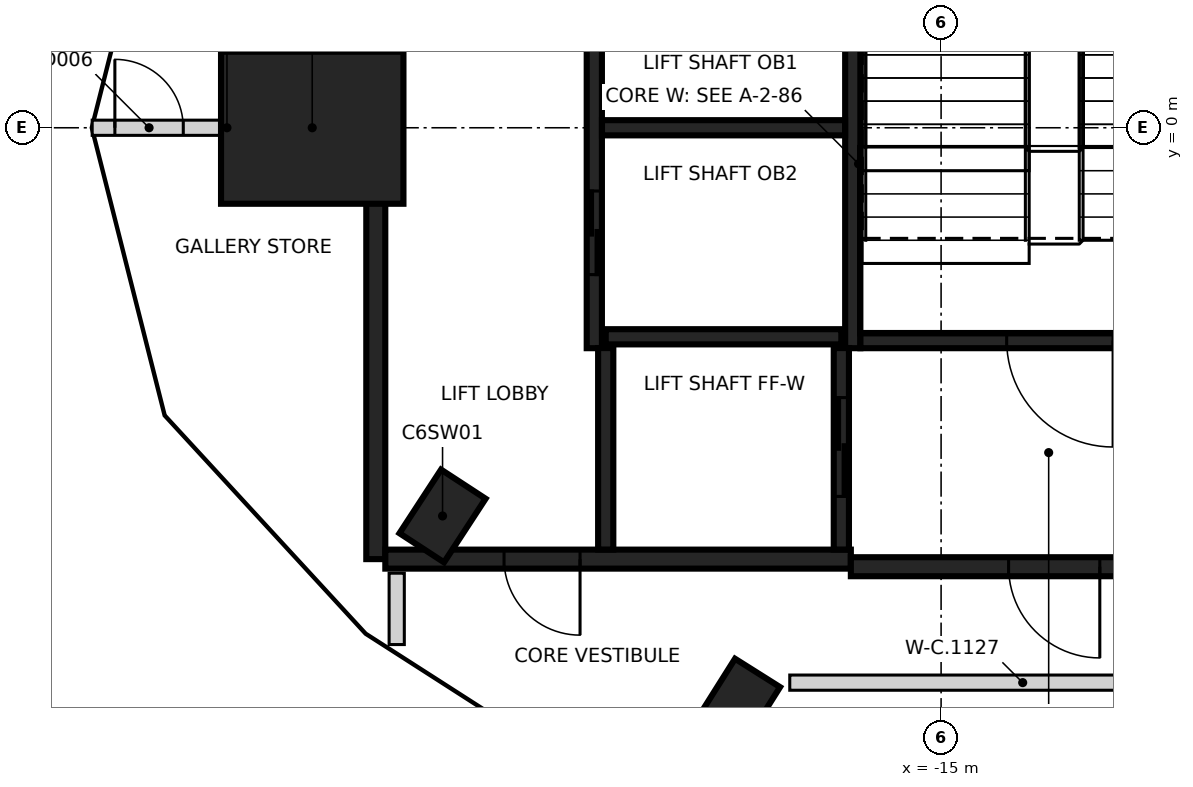
"""IFC4 building model, lengths in metres.
Left out: names, types, materials, properties, quantities, classifications, styles, units other than length and angle.
Written with IfcOpenShell. Run it as: python <this file> out.ifc"""

import sys

from ifc_helpers import new_model, si_unit, direction, frame, frame_2d, origin, origin_2d, place, context, subcontext, project, spatial, rectangle, extrude, element, fill, save


model = new_model("IFC4")
c1 = context("Model", 3, precision=1e-05, world=origin(), true_north=direction((0.0, 1.0)))
c2 = subcontext(c1, "Body", "Model", "MODEL_VIEW")
j1 = project(units=[si_unit("LENGTHUNIT", "METRE"), si_unit("PLANEANGLEUNIT", "RADIAN")], contexts=[c1])
p1 = place(None, origin())
s1 = spatial("IfcSite", under=j1, at=p1, CompositionType="ELEMENT")
p2 = place(p1, origin())
s2 = spatial("IfcBuilding", under=s1, at=p2, CompositionType="ELEMENT")
p3 = place(p2, frame((0.0, 0.0, 312.6)))
s3 = spatial("IfcBuildingStorey", under=s2, at=p3, CompositionType="ELEMENT", Elevation=312.6)
for number, where, z_axis, x_axis in (
    (1, (-21.559, -5.107, -0.35), (0.0, 0.0, 1.0), (0.547, 0.837, 0.0)),
    (2, (-17.681, -7.595, -0.35), (0.0, 0.0, 1.0), (0.533, 0.846, 0.0)),
):
    element("IfcColumn", number, at=place(p3, frame(where, z_axis=z_axis, x_axis=x_axis)), inside=s3, PredefinedType="COLUMN", context=c2, shape_type="SweptSolid", body=[
        extrude(rectangle(XDim=1.0, YDim=0.7, at=origin_2d()), origin(), (0.0, 0.0, 1.0), 8.1),
    ])
p4 = place(p3, frame((-23.273, 0.0, -0.35), z_axis=(0.0, 0.0, 1.0), x_axis=(1.0, 0.0, 0.0)))
e3 = element("IfcColumn", 3, at=p4, inside=s3, PredefinedType="COLUMN", context=c2, shape_type="SweptSolid", body=[
    extrude(rectangle(XDim=2.4, YDim=2.0, at=origin_2d()), origin(), (0.0, 0.0, 1.0), 8.1),
])
p5 = place(p3, frame((-22.437, -5.675, 0.0), z_axis=(0.0, 0.0, 1.0), x_axis=(0.0, 1.0, 0.0)))
e4 = element("IfcWall", 4, at=p5, inside=s3, PredefinedType="SHEAR", context=c2, shape_type="SweptSolid", body=[
    extrude(rectangle(XDim=8.75, YDim=0.25, at=frame_2d((4.375, 0.0))), origin(), (0.0, 0.0, 1.0), 7.75),
])
p6 = place(p3, frame((-16.187, -5.675, 0.0), z_axis=(0.0, 0.0, 1.0), x_axis=(-1.0, 0.0, 0.0)))
e5 = element("IfcWall", 5, at=p6, inside=s3, PredefinedType="SHEAR", context=c2, shape_type="SweptSolid", body=[
    extrude(rectangle(XDim=6.125, YDim=0.25, at=frame_2d((3.062, 0.0))), origin(), (0.0, 0.0, 1.0), 7.75),
])
p7 = place(p6, frame((3.563, 0.0, 0.0)))
e6 = element("IfcOpeningElement", 6, at=p7, cuts=e5, PredefinedType="OPENING", context=c2, shape_type="SweptSolid", body=[
    extrude(rectangle(XDim=1.0, YDim=2.1, at=frame_2d((0.5, 1.05))), frame((0.0, 0.135, 0.0), z_axis=(0.0, -1.0, 0.0), x_axis=(1.0, 0.0, 0.0)), (0.0, 0.0, 1.0), 0.27),
])
p8 = place(p3, frame((-10.963, -5.775, 0.0), z_axis=(0.0, 0.0, 1.0), x_axis=(-1.0, 0.0, 0.0)))
e7 = element("IfcWall", 7, at=p8, inside=s3, PredefinedType="SHEAR", context=c2, shape_type="SweptSolid", body=[
    extrude(rectangle(XDim=5.225, YDim=0.25, at=frame_2d((2.612, 0.0))), origin(), (0.0, 0.0, 1.0), 7.75),
])
p9 = place(p8, frame((1.949, 0.0, 0.0)))
e8 = element("IfcOpeningElement", 8, at=p9, cuts=e7, PredefinedType="OPENING", context=c2, shape_type="SweptSolid", body=[
    extrude(rectangle(XDim=1.2, YDim=2.1, at=frame_2d((0.6, 1.05))), frame((0.0, 0.135, 0.0), z_axis=(0.0, -1.0, 0.0), x_axis=(1.0, 0.0, 0.0)), (0.0, 0.0, 1.0), 0.27),
])
p10 = place(p3, frame((-16.162, 3.074, 0.0), z_axis=(0.0, 0.0, 1.0), x_axis=(0.0, -1.0, 0.0)))
e9 = element("IfcWall", 9, at=p10, inside=s3, PredefinedType="SHEAR", context=c2, shape_type="SweptSolid", body=[
    extrude(rectangle(XDim=5.974, YDim=0.2, at=frame_2d((2.987, 0.0))), origin(), (0.0, 0.0, 1.0), 7.75),
])
p11 = place(p3, frame((-19.562, -2.9, 0.0), z_axis=(0.0, 0.0, 1.0), x_axis=(0.0, 1.0, 0.0)))
e10 = element("IfcWall", 10, at=p11, inside=s3, PredefinedType="SHEAR", context=c2, shape_type="SweptSolid", body=[
    extrude(rectangle(XDim=6.1, YDim=0.2, at=frame_2d((3.05, 0.0))), origin(), (0.0, 0.0, 1.0), 7.75),
])
p12 = place(p11, frame((3.95, 0.0, 0.0)))
e11 = element("IfcOpeningElement", 11, at=p12, cuts=e10, PredefinedType="OPENING", context=c2, shape_type="SweptSolid", body=[
    extrude(rectangle(XDim=1.1, YDim=2.1, at=frame_2d((0.55, 1.05))), frame((0.0, 0.11, 0.0), z_axis=(0.0, -1.0, 0.0), x_axis=(1.0, 0.0, 0.0)), (0.0, 0.0, 1.0), 0.22),
])
p13 = place(p11, frame((0.968, 0.0, 0.0)))
e12 = element("IfcOpeningElement", 12, at=p13, cuts=e10, PredefinedType="OPENING", context=c2, shape_type="SweptSolid", body=[
    extrude(rectangle(XDim=1.1, YDim=2.1, at=frame_2d((0.55, 1.05))), frame((0.0, 0.11, 0.0), z_axis=(0.0, -1.0, 0.0), x_axis=(1.0, 0.0, 0.0)), (0.0, 0.0, 1.0), 0.22),
])
p14 = place(p3, frame((-10.963, -2.8, 0.0), z_axis=(0.0, 0.0, 1.0), x_axis=(-1.0, 0.0, 0.0)))
e13 = element("IfcWall", 13, at=p14, inside=s3, PredefinedType="SHEAR", context=c2, shape_type="SweptSolid", body=[
    extrude(rectangle(XDim=5.098, YDim=0.2, at=frame_2d((2.549, 0.0))), origin(), (0.0, 0.0, 1.0), 7.75),
])
p15 = place(p14, frame((1.774, 0.0, 0.0)))
e14 = element("IfcOpeningElement", 14, at=p15, cuts=e13, PredefinedType="OPENING", context=c2, shape_type="SweptSolid", body=[
    extrude(rectangle(XDim=1.4, YDim=2.1, at=frame_2d((0.7, 1.05))), frame((0.0, 0.11, 0.0), z_axis=(0.0, -1.0, 0.0), x_axis=(1.0, 0.0, 0.0)), (0.0, 0.0, 1.0), 0.22),
])
p16 = place(p3, frame((-16.263, 0.0, 0.0), z_axis=(0.0, 0.0, 1.0), x_axis=(-1.0, 0.0, 0.0)))
e15 = element("IfcWall", 15, at=p16, inside=s3, PredefinedType="SHEAR", context=c2, shape_type="SweptSolid", body=[
    extrude(rectangle(XDim=3.198, YDim=0.2, at=frame_2d((1.599, 0.0))), origin(), (0.0, 0.0, 1.0), 7.75),
])
p17 = place(p3, frame((-19.412, -2.75, 0.0), z_axis=(0.0, 0.0, 1.0), x_axis=(1.0, 0.0, 0.0)))
e16 = element("IfcWall", 16, at=p17, inside=s3, PredefinedType="SHEAR", context=c2, shape_type="SweptSolid", body=[
    extrude(rectangle(XDim=3.1, YDim=0.2, at=frame_2d((1.55, 0.0))), origin(), (0.0, 0.0, 1.0), 7.75),
])
p18 = place(p3, frame((-16.312, -2.898, 0.0), z_axis=(0.0, 0.0, 1.0), x_axis=(0.0, -1.0, 0.0)))
e17 = element("IfcWall", 17, at=p18, inside=s3, PredefinedType="SHEAR", context=c2, shape_type="SweptSolid", body=[
    extrude(rectangle(XDim=2.651, YDim=0.2, at=frame_2d((1.325, 0.0))), origin(), (0.0, 0.0, 1.0), 7.75),
])
p19 = place(p18, frame((0.652, 0.0, 0.0)))
e18 = element("IfcOpeningElement", 18, at=p19, cuts=e17, PredefinedType="OPENING", context=c2, shape_type="SweptSolid", body=[
    extrude(rectangle(XDim=1.3, YDim=2.1, at=frame_2d((0.65, 1.05))), frame((0.0, 0.11, 0.0), z_axis=(0.0, -1.0, 0.0), x_axis=(1.0, 0.0, 0.0)), (0.0, 0.0, 1.0), 0.22),
])
p20 = place(p3, frame((-19.412, -5.549, 0.0), z_axis=(0.0, 0.0, 1.0), x_axis=(0.0, 1.0, 0.0)))
e19 = element("IfcWall", 19, at=p20, inside=s3, PredefinedType="SHEAR", context=c2, shape_type="SweptSolid", body=[
    extrude(rectangle(XDim=2.651, YDim=0.2, at=frame_2d((1.325, 0.0))), origin(), (0.0, 0.0, 1.0), 7.75),
])
p21 = place(p3, frame((-22.162, -6.799, 0.0), z_axis=(0.0, 0.0, 1.0), x_axis=(0.0, 1.0, 0.0)))
e20 = element("IfcWall", 20, at=p21, inside=s3, PredefinedType="PARTITIONING", context=c2, shape_type="SweptSolid", body=[
    extrude(rectangle(XDim=0.939, YDim=0.2, at=frame_2d((0.469, 0.0))), origin(), (0.0, 0.0, 1.0), 7.75),
])
p22 = place(p3, frame((-16.991, -7.3, 0.0), z_axis=(0.0, 0.0, 1.0), x_axis=(1.0, 0.0, 0.0)))
e21 = element("IfcWall", 21, at=p22, inside=s3, PredefinedType="PARTITIONING", context=c2, shape_type="SweptSolid", body=[
    extrude(rectangle(XDim=6.129, YDim=0.2, at=frame_2d((3.064, 0.0))), origin(), (0.0, 0.0, 1.0), 7.75),
])
p23 = place(p3, frame((-26.168, 0.0, 0.0), z_axis=(0.0, 0.0, 1.0), x_axis=(1.0, 0.0, 0.0)))
e22 = element("IfcWall", 22, at=p23, inside=s3, PredefinedType="PARTITIONING", context=c2, shape_type="SweptSolid", body=[
    extrude(rectangle(XDim=3.546, YDim=0.2, at=frame_2d((1.773, 0.0))), origin(), (0.0, 0.0, 1.0), 7.75),
])
p24 = place(p23, frame((0.298, 0.0, 0.0)))
e23 = element("IfcOpeningElement", 23, at=p24, cuts=e22, PredefinedType="OPENING", context=c2, shape_type="SweptSolid", body=[
    extrude(rectangle(XDim=0.9, YDim=2.1, at=frame_2d((0.45, 1.05))), frame((0.0, 0.11, 0.0), z_axis=(0.0, -1.0, 0.0), x_axis=(1.0, 0.0, 0.0)), (0.0, 0.0, 1.0), 0.22),
])
p25 = place(p19, origin())
e24 = element("IfcDoor", 24, at=p25, inside=s3, OperationType="SLIDING_TO_RIGHT", PredefinedType="DOOR", context=c2, shape_type="SweptSolid", body=[
    extrude(rectangle(XDim=1.3, YDim=2.1, at=frame_2d((0.65, 1.05))), frame((0.0, 0.025, 0.0), z_axis=(0.0, -1.0, 0.0), x_axis=(1.0, 0.0, 0.0)), (0.0, 0.0, 1.0), 0.05),
])
fill(e18, e24)
p26 = place(p13, origin())
e25 = element("IfcDoor", 25, at=p26, inside=s3, OperationType="DOUBLE_DOOR_SLIDING", PredefinedType="DOOR", context=c2, shape_type="SweptSolid", body=[
    extrude(rectangle(XDim=1.1, YDim=2.1, at=frame_2d((0.55, 1.05))), frame((0.0, 0.025, 0.0), z_axis=(0.0, -1.0, 0.0), x_axis=(1.0, 0.0, 0.0)), (0.0, 0.0, 1.0), 0.05),
])
fill(e12, e25)
p27 = place(p7, origin())
e26 = element("IfcDoor", 26, at=p27, inside=s3, OperationType="SINGLE_SWING_LEFT", PredefinedType="DOOR", context=c2, shape_type="SweptSolid", body=[
    extrude(rectangle(XDim=1.0, YDim=2.1, at=frame_2d((0.5, 1.05))), frame((0.0, 0.025, 0.0), z_axis=(0.0, -1.0, 0.0), x_axis=(1.0, 0.0, 0.0)), (0.0, 0.0, 1.0), 0.05),
])
fill(e6, e26)
p28 = place(p9, origin())
e27 = element("IfcDoor", 27, at=p28, inside=s3, OperationType="SINGLE_SWING_LEFT", PredefinedType="DOOR", context=c2, shape_type="SweptSolid", body=[
    extrude(rectangle(XDim=1.2, YDim=2.1, at=frame_2d((0.6, 1.05))), frame((0.0, 0.025, 0.0), z_axis=(0.0, -1.0, 0.0), x_axis=(1.0, 0.0, 0.0)), (0.0, 0.0, 1.0), 0.05),
])
fill(e8, e27)
p29 = place(p15, origin())
e28 = element("IfcDoor", 28, at=p29, inside=s3, OperationType="SINGLE_SWING_LEFT", PredefinedType="DOOR", context=c2, shape_type="SweptSolid", body=[
    extrude(rectangle(XDim=1.4, YDim=2.1, at=frame_2d((0.7, 1.05))), frame((0.0, 0.025, 0.0), z_axis=(0.0, -1.0, 0.0), x_axis=(1.0, 0.0, 0.0)), (0.0, 0.0, 1.0), 0.05),
])
fill(e14, e28)
p30 = place(p24, frame((0.9, 0.0, 0.0), z_axis=(0.0, 0.0, 1.0), x_axis=(-1.0, 0.0, 0.0)))
e29 = element("IfcDoor", 29, at=p30, inside=s3, OperationType="SINGLE_SWING_LEFT", PredefinedType="DOOR", context=c2, shape_type="SweptSolid", body=[
    extrude(rectangle(XDim=0.9, YDim=2.1, at=frame_2d((0.45, 1.05))), frame((0.0, 0.025, 0.0), z_axis=(0.0, -1.0, 0.0), x_axis=(1.0, 0.0, 0.0)), (0.0, 0.0, 1.0), 0.05),
])
fill(e23, e29)
save(model, sys.argv[1])
